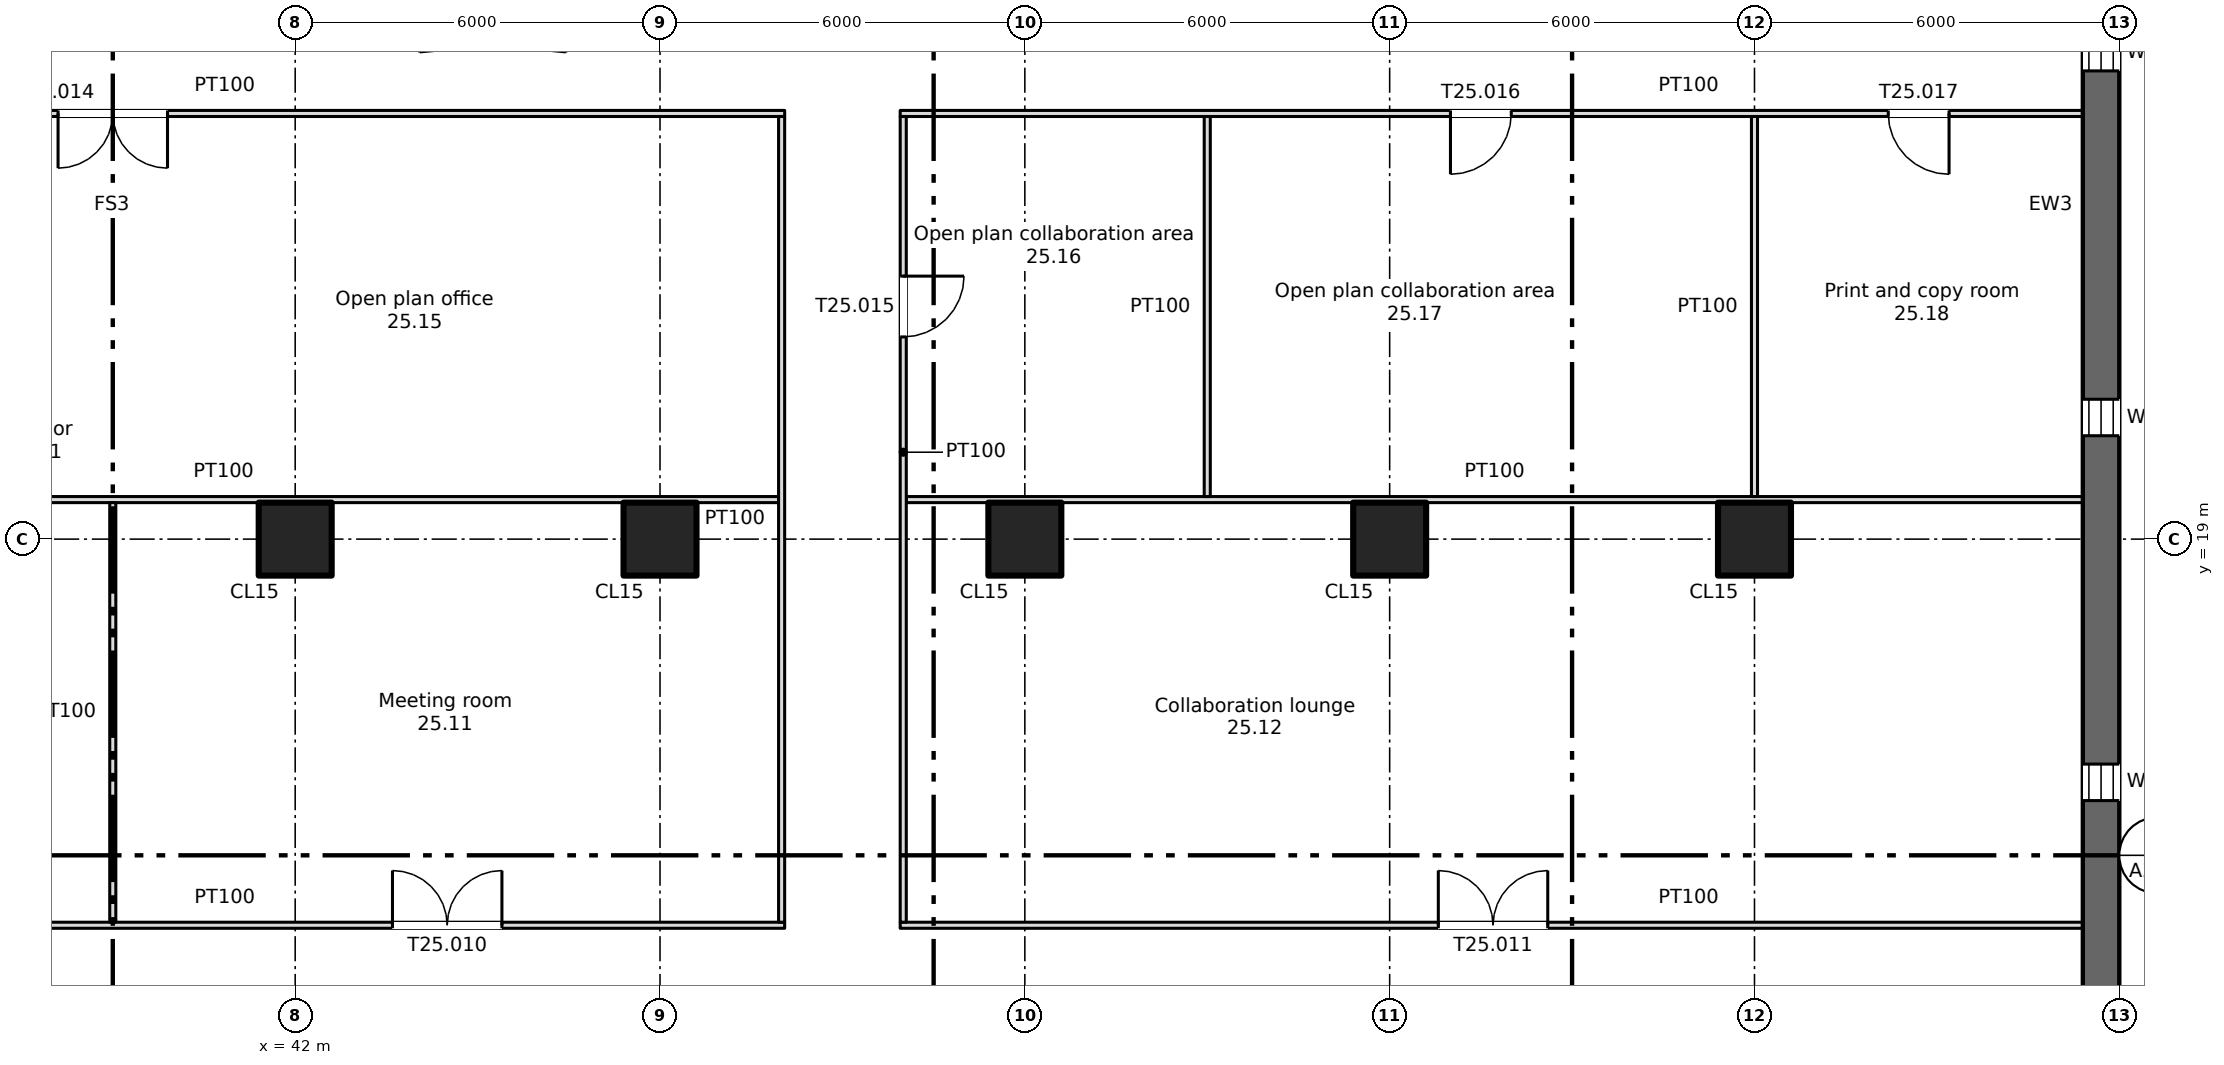
"""IFC4 building model, lengths in metres.
Left out: names, types, materials, properties, quantities, classifications, styles, units other than length and angle.
Written with IfcOpenShell. Run it as: python <this file> out.ifc"""

import sys

from ifc_helpers import new_model, si_unit, direction, frame, frame_2d, origin, origin_2d, place, context, subcontext, project, spatial, rectangle, extrude, element, fill, save


model = new_model("IFC4")
c1 = context("Model", 3, precision=1e-05, world=origin(), true_north=direction((0.0, 1.0)))
c2 = subcontext(c1, "Body", "Model", "MODEL_VIEW")
j1 = project(units=[si_unit("LENGTHUNIT", "METRE"), si_unit("PLANEANGLEUNIT", "RADIAN")], contexts=[c1])
p1 = place(None, origin())
s1 = spatial("IfcSite", under=j1, at=p1, CompositionType="ELEMENT")
p2 = place(p1, origin())
s2 = spatial("IfcBuilding", under=s1, at=p2, CompositionType="ELEMENT")
p3 = place(p2, frame((0.0, 0.0, 170.5)))
s3 = spatial("IfcBuildingStorey", under=s2, at=p3, CompositionType="ELEMENT", Elevation=170.5)
for number, where, z_axis, x_axis in (
    (1, (42.0, 19.0, 0.0), (0.0, 0.0, 1.0), (1.0, 0.0, 0.0)),
    (2, (48.0, 19.0, 0.0), (0.0, 0.0, 1.0), (1.0, 0.0, 0.0)),
    (3, (54.0, 19.0, 0.0), (0.0, 0.0, 1.0), (1.0, 0.0, 0.0)),
    (4, (60.0, 19.0, 0.0), (0.0, 0.0, 1.0), (1.0, 0.0, 0.0)),
    (5, (66.0, 19.0, 0.0), (0.0, 0.0, 1.0), (1.0, 0.0, 0.0)),
):
    element("IfcColumn", number, at=place(p3, frame(where, z_axis=z_axis, x_axis=x_axis)), inside=s3, PredefinedType="COLUMN", context=c2, shape_type="SweptSolid", body=[
        extrude(rectangle(XDim=1.2, YDim=1.2, at=origin_2d()), origin(), (0.0, 0.0, 1.0), 3.35),
    ])
p4 = place(p3, frame((71.7, 7.5, 0.0), z_axis=(0.0, 0.0, 1.0), x_axis=(0.0, 1.0, 0.0)))
e6 = element("IfcWall", 6, at=p4, inside=s3, PredefinedType="SHEAR", context=c2, shape_type="SweptSolid", body=[
    extrude(rectangle(XDim=34.0, YDim=0.6, at=frame_2d((17.0, 0.0))), origin(), (0.0, 0.0, 1.0), 3.35),
])
p5 = place(p4, frame((1.2, 0.0, 0.6)))
e7 = element("IfcOpeningElement", 7, at=p5, cuts=e6, PredefinedType="OPENING", context=c2, shape_type="SweptSolid", body=[
    extrude(rectangle(XDim=0.6, YDim=2.4, at=frame_2d((0.3, 1.2))), frame((0.0, 0.31, 0.0), z_axis=(0.0, -1.0, 0.0), x_axis=(1.0, 0.0, 0.0)), (0.0, 0.0, 1.0), 0.62),
])
p6 = place(p4, frame((7.2, 0.0, 0.6)))
e8 = element("IfcOpeningElement", 8, at=p6, cuts=e6, PredefinedType="OPENING", context=c2, shape_type="SweptSolid", body=[
    extrude(rectangle(XDim=0.6, YDim=2.4, at=frame_2d((0.3, 1.2))), frame((0.0, 0.31, 0.0), z_axis=(0.0, -1.0, 0.0), x_axis=(1.0, 0.0, 0.0)), (0.0, 0.0, 1.0), 0.62),
])
p7 = place(p4, frame((13.2, 0.0, 0.6)))
e9 = element("IfcOpeningElement", 9, at=p7, cuts=e6, PredefinedType="OPENING", context=c2, shape_type="SweptSolid", body=[
    extrude(rectangle(XDim=0.6, YDim=2.4, at=frame_2d((0.3, 1.2))), frame((0.0, 0.31, 0.0), z_axis=(0.0, -1.0, 0.0), x_axis=(1.0, 0.0, 0.0)), (0.0, 0.0, 1.0), 0.62),
])
p8 = place(p4, frame((19.2, 0.0, 0.6)))
e10 = element("IfcOpeningElement", 10, at=p8, cuts=e6, PredefinedType="OPENING", context=c2, shape_type="SweptSolid", body=[
    extrude(rectangle(XDim=0.6, YDim=2.4, at=frame_2d((0.3, 1.2))), frame((0.0, 0.31, 0.0), z_axis=(0.0, -1.0, 0.0), x_axis=(1.0, 0.0, 0.0)), (0.0, 0.0, 1.0), 0.62),
])
p9 = place(p4, frame((25.2, 0.0, 0.6)))
e11 = element("IfcOpeningElement", 11, at=p9, cuts=e6, PredefinedType="OPENING", context=c2, shape_type="SweptSolid", body=[
    extrude(rectangle(XDim=0.6, YDim=2.4, at=frame_2d((0.3, 1.2))), frame((0.0, 0.31, 0.0), z_axis=(0.0, -1.0, 0.0), x_axis=(1.0, 0.0, 0.0)), (0.0, 0.0, 1.0), 0.62),
])
p10 = place(p4, frame((31.2, 0.0, 0.6)))
e12 = element("IfcOpeningElement", 12, at=p10, cuts=e6, PredefinedType="OPENING", context=c2, shape_type="SweptSolid", body=[
    extrude(rectangle(XDim=0.6, YDim=2.4, at=frame_2d((0.3, 1.2))), frame((0.0, 0.31, 0.0), z_axis=(0.0, -1.0, 0.0), x_axis=(1.0, 0.0, 0.0)), (0.0, 0.0, 1.0), 0.62),
])
p11 = place(p3, frame((27.95, 12.65, 0.0), z_axis=(0.0, 0.0, 1.0), x_axis=(1.0, 0.0, 0.0)))
e13 = element("IfcWall", 13, at=p11, inside=s3, PredefinedType="PARTITIONING", context=c2, shape_type="SweptSolid", body=[
    extrude(rectangle(XDim=22.1, YDim=0.1, at=frame_2d((11.05, 0.0))), origin(), (0.0, 0.0, 1.0), 3.35),
])
p12 = place(p11, frame((4.65, 0.0, 0.0)))
e14 = element("IfcOpeningElement", 14, at=p12, cuts=e13, PredefinedType="OPENING", context=c2, shape_type="SweptSolid", body=[
    extrude(rectangle(XDim=1.8, YDim=2.1, at=frame_2d((0.9, 1.05))), frame((0.0, 0.06, 0.0), z_axis=(0.0, -1.0, 0.0), x_axis=(1.0, 0.0, 0.0)), (0.0, 0.0, 1.0), 0.12),
])
p13 = place(p11, frame((15.65, 0.0, 0.0)))
e15 = element("IfcOpeningElement", 15, at=p13, cuts=e13, PredefinedType="OPENING", context=c2, shape_type="SweptSolid", body=[
    extrude(rectangle(XDim=1.8, YDim=2.1, at=frame_2d((0.9, 1.05))), frame((0.0, 0.06, 0.0), z_axis=(0.0, -1.0, 0.0), x_axis=(1.0, 0.0, 0.0)), (0.0, 0.0, 1.0), 0.12),
])
p14 = place(p3, frame((51.95, 12.65, 0.0), z_axis=(0.0, 0.0, 1.0), x_axis=(1.0, 0.0, 0.0)))
e16 = element("IfcWall", 16, at=p14, inside=s3, PredefinedType="PARTITIONING", context=c2, shape_type="SweptSolid", body=[
    extrude(rectangle(XDim=19.45, YDim=0.1, at=frame_2d((9.725, 0.0))), origin(), (0.0, 0.0, 1.0), 3.35),
])
p15 = place(p14, frame((8.85, 0.0, 0.0)))
e17 = element("IfcOpeningElement", 17, at=p15, cuts=e16, PredefinedType="OPENING", context=c2, shape_type="SweptSolid", body=[
    extrude(rectangle(XDim=1.8, YDim=2.1, at=frame_2d((0.9, 1.05))), frame((0.0, 0.06, 0.0), z_axis=(0.0, -1.0, 0.0), x_axis=(1.0, 0.0, 0.0)), (0.0, 0.0, 1.0), 0.12),
])
p16 = place(p3, frame((28.05, 19.65, 0.0), z_axis=(0.0, 0.0, 1.0), x_axis=(1.0, 0.0, 0.0)))
e18 = element("IfcWall", 18, at=p16, inside=s3, PredefinedType="PARTITIONING", context=c2, shape_type="SweptSolid", body=[
    extrude(rectangle(XDim=21.9, YDim=0.1, at=frame_2d((10.95, 0.0))), origin(), (0.0, 0.0, 1.0), 3.35),
])
p17 = place(p3, frame((52.05, 19.65, 0.0), z_axis=(0.0, 0.0, 1.0), x_axis=(1.0, 0.0, 0.0)))
e19 = element("IfcWall", 19, at=p17, inside=s3, PredefinedType="PARTITIONING", context=c2, shape_type="SweptSolid", body=[
    extrude(rectangle(XDim=19.35, YDim=0.1, at=frame_2d((9.675, 0.0))), origin(), (0.0, 0.0, 1.0), 3.35),
])
p18 = place(p3, frame((27.95, 26.0, 0.0), z_axis=(0.0, 0.0, 1.0), x_axis=(1.0, 0.0, 0.0)))
e20 = element("IfcWall", 20, at=p18, inside=s3, PredefinedType="PARTITIONING", context=c2, shape_type="SweptSolid", body=[
    extrude(rectangle(XDim=22.1, YDim=0.1, at=frame_2d((11.05, 0.0))), origin(), (0.0, 0.0, 1.0), 3.35),
])
p19 = place(p18, frame((10.15, 0.0, 0.0)))
e21 = element("IfcOpeningElement", 21, at=p19, cuts=e20, PredefinedType="OPENING", context=c2, shape_type="SweptSolid", body=[
    extrude(rectangle(XDim=1.8, YDim=2.1, at=frame_2d((0.9, 1.05))), frame((0.0, 0.06, 0.0), z_axis=(0.0, -1.0, 0.0), x_axis=(1.0, 0.0, 0.0)), (0.0, 0.0, 1.0), 0.12),
])
p20 = place(p3, frame((51.95, 26.0, 0.0), z_axis=(0.0, 0.0, 1.0), x_axis=(1.0, 0.0, 0.0)))
e22 = element("IfcWall", 22, at=p20, inside=s3, PredefinedType="PARTITIONING", context=c2, shape_type="SweptSolid", body=[
    extrude(rectangle(XDim=19.45, YDim=0.1, at=frame_2d((9.725, 0.0))), origin(), (0.0, 0.0, 1.0), 3.35),
])
p21 = place(p20, frame((9.05, 0.0, 0.0)))
e23 = element("IfcOpeningElement", 23, at=p21, cuts=e22, PredefinedType="OPENING", context=c2, shape_type="SweptSolid", body=[
    extrude(rectangle(XDim=1.0, YDim=2.1, at=frame_2d((0.5, 1.05))), frame((0.0, 0.06, 0.0), z_axis=(0.0, -1.0, 0.0), x_axis=(1.0, 0.0, 0.0)), (0.0, 0.0, 1.0), 0.12),
])
p22 = place(p20, frame((16.25, 0.0, 0.0)))
e24 = element("IfcOpeningElement", 24, at=p22, cuts=e22, PredefinedType="OPENING", context=c2, shape_type="SweptSolid", body=[
    extrude(rectangle(XDim=1.0, YDim=2.1, at=frame_2d((0.5, 1.05))), frame((0.0, 0.06, 0.0), z_axis=(0.0, -1.0, 0.0), x_axis=(1.0, 0.0, 0.0)), (0.0, 0.0, 1.0), 0.12),
])
p23 = place(p3, frame((39.0, 12.7, 0.0), z_axis=(0.0, 0.0, 1.0), x_axis=(0.0, 1.0, 0.0)))
e25 = element("IfcWall", 25, at=p23, inside=s3, PredefinedType="PARTITIONING", context=c2, shape_type="SweptSolid", body=[
    extrude(rectangle(XDim=6.9, YDim=0.1, at=frame_2d((3.45, 0.0))), origin(), (0.0, 0.0, 1.0), 3.35),
])
p24 = place(p3, frame((50.0, 12.7, 0.0), z_axis=(0.0, 0.0, 1.0), x_axis=(0.0, 1.0, 0.0)))
e26 = element("IfcWall", 26, at=p24, inside=s3, PredefinedType="PARTITIONING", context=c2, shape_type="SweptSolid", body=[
    extrude(rectangle(XDim=13.25, YDim=0.1, at=frame_2d((6.625, 0.0))), origin(), (0.0, 0.0, 1.0), 3.35),
])
p25 = place(p3, frame((52.0, 12.7, 0.0), z_axis=(0.0, 0.0, 1.0), x_axis=(0.0, 1.0, 0.0)))
e27 = element("IfcWall", 27, at=p25, inside=s3, PredefinedType="PARTITIONING", context=c2, shape_type="SweptSolid", body=[
    extrude(rectangle(XDim=13.25, YDim=0.1, at=frame_2d((6.625, 0.0))), origin(), (0.0, 0.0, 1.0), 3.35),
])
p26 = place(p25, frame((9.625, 0.0, 0.0)))
e28 = element("IfcOpeningElement", 28, at=p26, cuts=e27, PredefinedType="OPENING", context=c2, shape_type="SweptSolid", body=[
    extrude(rectangle(XDim=1.0, YDim=2.1, at=frame_2d((0.5, 1.05))), frame((0.0, 0.06, 0.0), z_axis=(0.0, -1.0, 0.0), x_axis=(1.0, 0.0, 0.0)), (0.0, 0.0, 1.0), 0.12),
])
for number, where, z_axis, x_axis in (
    (29, (57.0, 19.7, 0.0), (0.0, 0.0, 1.0), (0.0, 1.0, 0.0)),
    (30, (66.0, 19.7, 0.0), (0.0, 0.0, 1.0), (0.0, 1.0, 0.0)),
):
    element("IfcWall", number, at=place(p3, frame(where, z_axis=z_axis, x_axis=x_axis)), inside=s3, PredefinedType="PARTITIONING", context=c2, shape_type="SweptSolid", body=[
        extrude(rectangle(XDim=6.25, YDim=0.1, at=frame_2d((3.125, 0.0))), origin(), (0.0, 0.0, 1.0), 3.35),
    ])
p27 = place(p6, origin())
e31 = element("IfcWindow", 31, at=p27, inside=s3, PartitioningType="SINGLE_PANEL", PredefinedType="WINDOW", context=c2, shape_type="SweptSolid", body=[
    extrude(rectangle(XDim=0.6, YDim=2.4, at=frame_2d((0.3, 1.2))), frame((0.0, 0.03, 0.0), z_axis=(0.0, -1.0, 0.0), x_axis=(1.0, 0.0, 0.0)), (0.0, 0.0, 1.0), 0.06),
])
fill(e8, e31)
p28 = place(p7, origin())
e32 = element("IfcWindow", 32, at=p28, inside=s3, PartitioningType="SINGLE_PANEL", PredefinedType="WINDOW", context=c2, shape_type="SweptSolid", body=[
    extrude(rectangle(XDim=0.6, YDim=2.4, at=frame_2d((0.3, 1.2))), frame((0.0, 0.03, 0.0), z_axis=(0.0, -1.0, 0.0), x_axis=(1.0, 0.0, 0.0)), (0.0, 0.0, 1.0), 0.06),
])
fill(e9, e32)
p29 = place(p8, origin())
e33 = element("IfcWindow", 33, at=p29, inside=s3, PartitioningType="SINGLE_PANEL", PredefinedType="WINDOW", context=c2, shape_type="SweptSolid", body=[
    extrude(rectangle(XDim=0.6, YDim=2.4, at=frame_2d((0.3, 1.2))), frame((0.0, 0.03, 0.0), z_axis=(0.0, -1.0, 0.0), x_axis=(1.0, 0.0, 0.0)), (0.0, 0.0, 1.0), 0.06),
])
fill(e10, e33)
p30 = place(p13, origin())
e34 = element("IfcDoor", 34, at=p30, inside=s3, OperationType="DOUBLE_DOOR_SINGLE_SWING", PredefinedType="DOOR", context=c2, shape_type="SweptSolid", body=[
    extrude(rectangle(XDim=1.8, YDim=2.1, at=frame_2d((0.9, 1.05))), frame((0.0, 0.025, 0.0), z_axis=(0.0, -1.0, 0.0), x_axis=(1.0, 0.0, 0.0)), (0.0, 0.0, 1.0), 0.05),
])
fill(e15, e34)
p31 = place(p15, origin())
e35 = element("IfcDoor", 35, at=p31, inside=s3, OperationType="DOUBLE_DOOR_SINGLE_SWING", PredefinedType="DOOR", context=c2, shape_type="SweptSolid", body=[
    extrude(rectangle(XDim=1.8, YDim=2.1, at=frame_2d((0.9, 1.05))), frame((0.0, 0.025, 0.0), z_axis=(0.0, -1.0, 0.0), x_axis=(1.0, 0.0, 0.0)), (0.0, 0.0, 1.0), 0.05),
])
fill(e17, e35)
p32 = place(p19, origin())
e36 = element("IfcDoor", 36, at=p32, inside=s3, OperationType="DOUBLE_DOOR_SINGLE_SWING", PredefinedType="DOOR", context=c2, shape_type="SweptSolid", body=[
    extrude(rectangle(XDim=1.8, YDim=2.1, at=frame_2d((0.9, 1.05))), frame((0.0, 0.025, 0.0), z_axis=(0.0, -1.0, 0.0), x_axis=(1.0, 0.0, 0.0)), (0.0, 0.0, 1.0), 0.05),
])
fill(e21, e36)
p33 = place(p26, origin())
e37 = element("IfcDoor", 37, at=p33, inside=s3, OperationType="SINGLE_SWING_RIGHT", PredefinedType="DOOR", context=c2, shape_type="SweptSolid", body=[
    extrude(rectangle(XDim=1.0, YDim=2.1, at=frame_2d((0.5, 1.05))), frame((0.0, 0.025, 0.0), z_axis=(0.0, -1.0, 0.0), x_axis=(1.0, 0.0, 0.0)), (0.0, 0.0, 1.0), 0.05),
])
fill(e28, e37)
p34 = place(p21, origin())
e38 = element("IfcDoor", 38, at=p34, inside=s3, OperationType="SINGLE_SWING_LEFT", PredefinedType="DOOR", context=c2, shape_type="SweptSolid", body=[
    extrude(rectangle(XDim=1.0, YDim=2.1, at=frame_2d((0.5, 1.05))), frame((0.0, 0.025, 0.0), z_axis=(0.0, -1.0, 0.0), x_axis=(1.0, 0.0, 0.0)), (0.0, 0.0, 1.0), 0.05),
])
fill(e23, e38)
p35 = place(p22, origin())
e39 = element("IfcDoor", 39, at=p35, inside=s3, OperationType="SINGLE_SWING_RIGHT", PredefinedType="DOOR", context=c2, shape_type="SweptSolid", body=[
    extrude(rectangle(XDim=1.0, YDim=2.1, at=frame_2d((0.5, 1.05))), frame((0.0, 0.025, 0.0), z_axis=(0.0, -1.0, 0.0), x_axis=(1.0, 0.0, 0.0)), (0.0, 0.0, 1.0), 0.05),
])
fill(e24, e39)
save(model, sys.argv[1])
